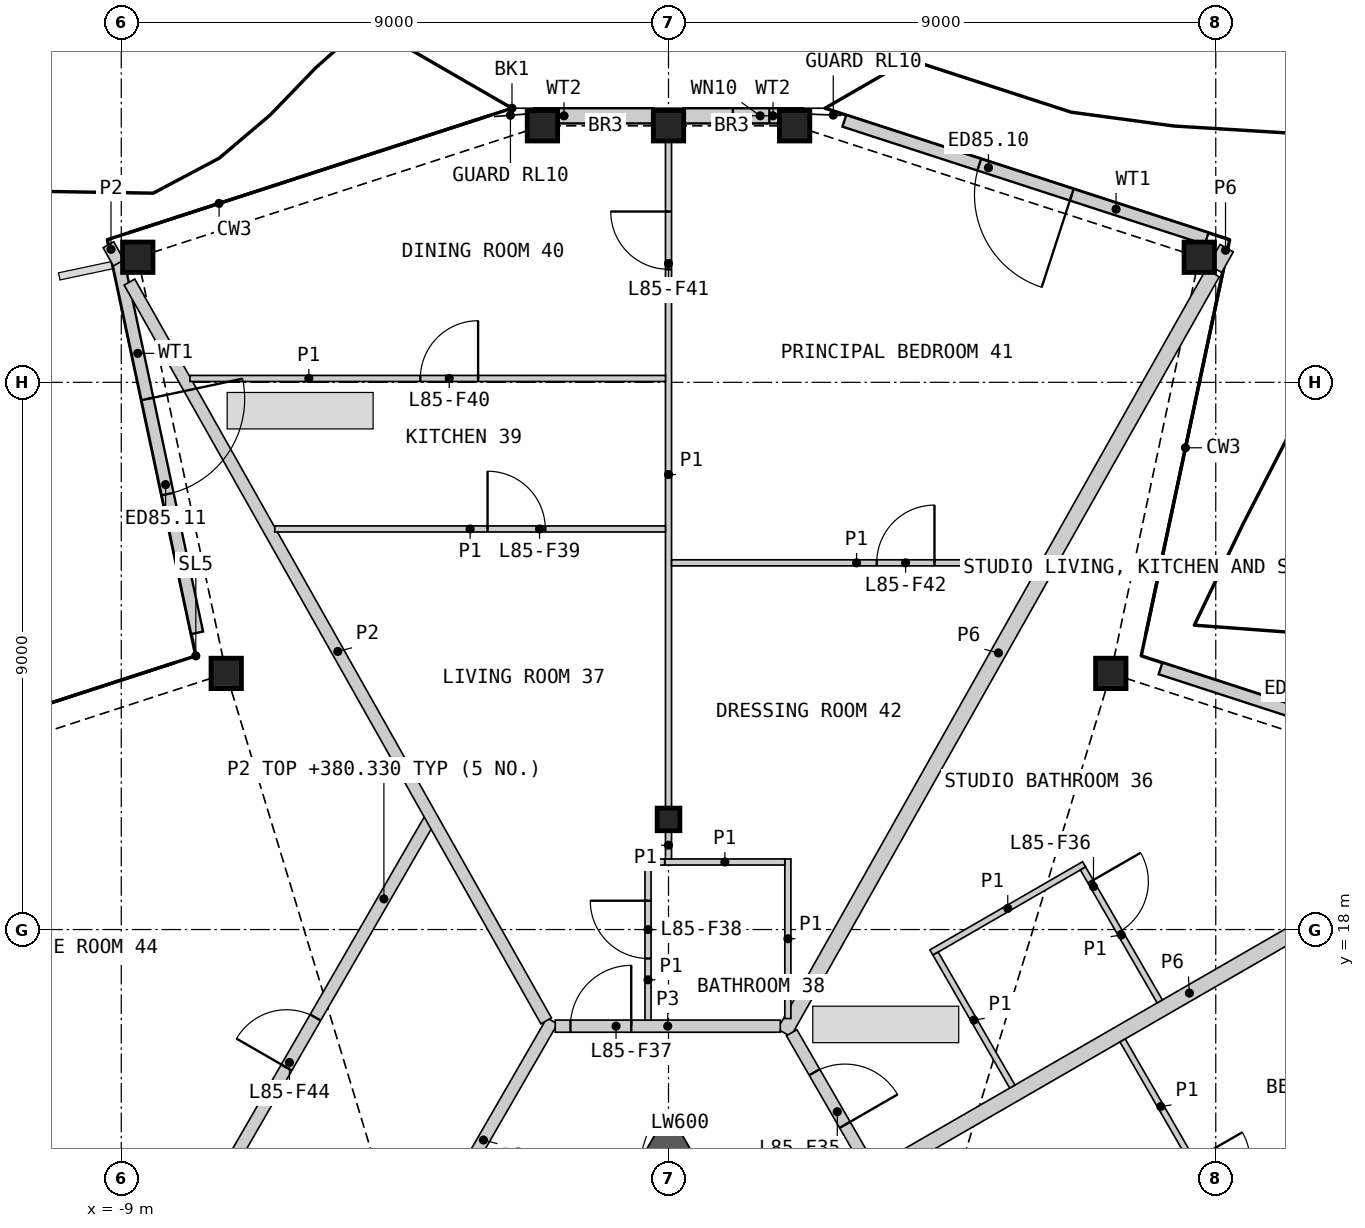
"""IFC4 building model, lengths in metres.
Left out: names, types, materials, properties, quantities, classifications, styles, units other than length and angle.
Written with IfcOpenShell. Run it as: python <this file> out.ifc"""

import sys

from ifc_helpers import new_model, si_unit, direction, frame, frame_2d, origin, origin_2d, place, context, subcontext, project, spatial, polyline, rectangle, hollow_rectangle, i_section, outline, extrude, element, fill, save


model = new_model("IFC4")
c1 = context("Model", 3, precision=1e-05, world=origin(), true_north=direction((0.0, 1.0)))
c2 = subcontext(c1, "Body", "Model", "MODEL_VIEW")
j1 = project(units=[si_unit("LENGTHUNIT", "METRE"), si_unit("PLANEANGLEUNIT", "RADIAN")], contexts=[c1])
p1 = place(None, origin())
s1 = spatial("IfcSite", under=j1, at=p1, CompositionType="ELEMENT")
p2 = place(p1, origin())
s2 = spatial("IfcBuilding", under=s1, at=p2, CompositionType="ELEMENT")
p3 = place(p2, frame((0.0, 0.0, 378.0)))
s3 = spatial("IfcBuildingStorey", under=s2, at=p3, CompositionType="ELEMENT", Elevation=378.0)
for number, where, z_axis, x_axis in (
    (1, (7.274, 22.213, 0.0), (0.0, 0.0, 1.0), (1.0, 0.0, 0.0)),
    (2, (8.729, 29.057, 0.0), (0.0, 0.0, 1.0), (1.0, 0.0, 0.0)),
    (3, (2.074, 31.219, 0.0), (0.0, 0.0, 1.0), (1.0, 0.0, 0.0)),
    (4, (0.0, 31.219, 0.0), (0.0, 0.0, 1.0), (1.0, 0.0, 0.0)),
    (5, (-2.074, 31.219, 0.0), (0.0, 0.0, 1.0), (1.0, 0.0, 0.0)),
    (6, (-8.729, 29.057, 0.0), (0.0, 0.0, 1.0), (1.0, 0.0, 0.0)),
    (7, (-7.274, 22.213, 0.0), (0.0, 0.0, 1.0), (1.0, 0.0, 0.0)),
):
    element("IfcColumn", number, at=place(p3, frame(where, z_axis=z_axis, x_axis=x_axis)), inside=s3, PredefinedType="COLUMN", context=c2, shape_type="SweptSolid", body=[
        extrude(hollow_rectangle(XDim=0.5, YDim=0.5, WallThickness=0.03, at=origin_2d()), origin(), (0.0, 0.0, 1.0), 3.4),
    ])
p4 = place(p3, frame((0.0, 19.811, 0.0), z_axis=(0.0, 0.0, 1.0), x_axis=(1.0, 0.0, 0.0)))
e8 = element("IfcColumn", 8, at=p4, inside=s3, PredefinedType="COLUMN", context=c2, shape_type="SweptSolid", body=[
    extrude(i_section(OverallWidth=0.374, OverallDepth=0.372, WebThickness=0.016, FlangeThickness=0.026, at=origin_2d()), origin(), (0.0, 0.0, 1.0), 3.4),
])
p5 = place(p3, frame((14.05, 20.357, 0.0), z_axis=(0.0, 0.0, 1.0), x_axis=(-0.951060123915, 0.309005891041, 0.0)))
e9 = element("IfcWall", 9, at=p5, inside=s3, PredefinedType="SOLIDWALL", context=c2, shape_type="SweptSolid", body=[
    extrude(rectangle(XDim=6.265, YDim=0.2, at=frame_2d((3.133, 0.0))), origin(), (0.0, 0.0, 1.0), 2.634),
])
p6 = place(p5, frame((2.333, 0.0, 0.0)))
e10 = element("IfcOpeningElement", 10, at=p6, cuts=e9, PredefinedType="OPENING", context=c2, shape_type="SweptSolid", body=[
    extrude(rectangle(XDim=1.6, YDim=2.25, at=frame_2d((0.8, 1.125))), frame((0.0, 0.11, 0.0), z_axis=(0.0, -1.0, 0.0), x_axis=(1.0, 0.0, 0.0)), (0.0, 0.0, 1.0), 0.22),
])
p7 = place(p3, frame((8.85, 29.364, 0.0), z_axis=(0.0, 0.0, 1.0), x_axis=(-0.951048671744, 0.309041136379, 0.0)))
e11 = element("IfcWall", 11, at=p7, inside=s3, PredefinedType="SOLIDWALL", context=c2, shape_type="SweptSolid", body=[
    extrude(rectangle(XDim=6.265, YDim=0.2, at=frame_2d((3.133, 0.0))), origin(), (0.0, 0.0, 1.0), 2.634),
])
p8 = place(p7, frame((2.333, 0.0, 0.0)))
e12 = element("IfcOpeningElement", 12, at=p8, cuts=e11, PredefinedType="OPENING", context=c2, shape_type="SweptSolid", body=[
    extrude(rectangle(XDim=1.6, YDim=2.25, at=frame_2d((0.8, 1.125))), frame((0.0, 0.11, 0.0), z_axis=(0.0, -1.0, 0.0), x_axis=(1.0, 0.0, 0.0)), (0.0, 0.0, 1.0), 0.22),
])
p9 = place(p3, frame((2.208, 31.383, 0.0), z_axis=(0.0, 0.0, 1.0), x_axis=(-1.0, 0.0, 0.0)))
e13 = element("IfcWall", 13, at=p9, inside=s3, PredefinedType="SOLIDWALL", context=c2, shape_type="SweptSolid", body=[
    extrude(rectangle(XDim=1.958, YDim=0.25, at=frame_2d((0.979, 0.0))), origin(), (0.0, 0.0, 1.0), 2.634),
])
p10 = place(p9, frame((0.55, 0.0, 0.4)))
e14 = element("IfcOpeningElement", 14, at=p10, cuts=e13, PredefinedType="OPENING", context=c2, shape_type="SweptSolid", body=[
    extrude(rectangle(XDim=0.6, YDim=0.6, at=frame_2d((0.3, 0.3))), frame((0.0, 0.135, 0.0), z_axis=(0.0, -1.0, 0.0), x_axis=(1.0, 0.0, 0.0)), (0.0, 0.0, 1.0), 0.27),
])
p11 = place(p3, frame((-0.25, 31.383, 0.0), z_axis=(0.0, 0.0, 1.0), x_axis=(-1.0, 0.0, 0.0)))
e15 = element("IfcWall", 15, at=p11, inside=s3, PredefinedType="SOLIDWALL", context=c2, shape_type="SweptSolid", body=[
    extrude(rectangle(XDim=1.958, YDim=0.25, at=frame_2d((0.979, 0.0))), origin(), (0.0, 0.0, 1.0), 2.634),
])
p12 = place(p3, frame((-9.055, 29.009, 0.0), z_axis=(0.0, 0.0, 1.0), x_axis=(0.207926797195, -0.978144389652, 0.0)))
e16 = element("IfcWall", 16, at=p12, inside=s3, PredefinedType="SOLIDWALL", context=c2, shape_type="SweptSolid", body=[
    extrude(rectangle(XDim=6.265, YDim=0.2, at=frame_2d((3.133, 0.0))), origin(), (0.0, 0.0, 1.0), 2.634),
])
p13 = place(p12, frame((2.333, 0.0, 0.0)))
e17 = element("IfcOpeningElement", 17, at=p13, cuts=e16, PredefinedType="OPENING", context=c2, shape_type="SweptSolid", body=[
    extrude(rectangle(XDim=1.6, YDim=2.25, at=frame_2d((0.8, 1.125))), frame((0.0, 0.11, 0.0), z_axis=(0.0, -1.0, 0.0), x_axis=(1.0, 0.0, 0.0)), (0.0, 0.0, 1.0), 0.22),
])
p14 = place(p3, origin())
e18 = element("IfcWall", 18, at=p14, inside=s3, PredefinedType="SHEAR", context=c2, shape_type="SweptSolid", body=[
    extrude(outline(polyline([(-0.52, 14.111), (0.0, 15.011), (0.52, 14.111), (0.0, 13.811), (-0.52, 14.111)])), origin(), (0.0, 0.0, 1.0), 3.1),
])
p15 = place(p3, frame((1.902, 16.302, 0.0), z_axis=(0.0, 0.0, 1.0), x_axis=(0.491233789602, 0.871027763021, 0.0)))
e19 = element("IfcWall", 19, at=p15, inside=s3, PredefinedType="PARTITIONING", context=c2, shape_type="SweptSolid", body=[
    extrude(rectangle(XDim=14.345, YDim=0.25, at=frame_2d((7.173, 0.0))), origin(), (0.0, 0.0, 1.0), 2.33),
])
p16 = place(p3, frame((3.465, 14.01, 0.0), z_axis=(0.0, 0.0, 1.0), x_axis=(0.866032376801, 0.499987922186, 0.0)))
e20 = element("IfcWall", 20, at=p16, inside=s3, PredefinedType="PARTITIONING", context=c2, shape_type="SweptSolid", body=[
    extrude(rectangle(XDim=11.782, YDim=0.25, at=frame_2d((5.891, 0.0))), origin(), (0.0, 0.0, 1.0), 2.33),
])
p17 = place(p3, frame((-4.176, 12.579, 0.0), z_axis=(0.0, 0.0, 1.0), x_axis=(0.499974648164, 0.866040040179, 0.0)))
e21 = element("IfcWall", 21, at=p17, inside=s3, PredefinedType="PARTITIONING", context=c2, shape_type="SweptSolid", body=[
    extrude(rectangle(XDim=4.525, YDim=0.2, at=frame_2d((2.263, 0.0))), origin(), (0.0, 0.0, 1.0), 3.1),
])
p18 = place(p3, frame((2.025, 16.303, 0.0), z_axis=(0.0, 0.0, 1.0), x_axis=(0.500004215162, -0.866022970146, 0.0)))
e22 = element("IfcWall", 22, at=p18, inside=s3, PredefinedType="PARTITIONING", context=c2, shape_type="SweptSolid", body=[
    extrude(rectangle(XDim=4.3, YDim=0.2, at=frame_2d((2.15, 0.0))), origin(), (0.0, 0.0, 1.0), 3.1),
])
p19 = place(p18, frame((0.75, 0.0, 0.0)))
e23 = element("IfcOpeningElement", 23, at=p19, cuts=e22, PredefinedType="OPENING", context=c2, shape_type="SweptSolid", body=[
    extrude(rectangle(XDim=1.0, YDim=2.1, at=frame_2d((0.5, 1.05))), frame((0.0, 0.11, 0.0), z_axis=(0.0, -1.0, 0.0), x_axis=(1.0, 0.0, 0.0)), (0.0, 0.0, 1.0), 0.22),
])
p20 = place(p3, frame((-1.863, 16.411, 0.0), z_axis=(0.0, 0.0, 1.0), x_axis=(1.0, 0.0, 0.0)))
e24 = element("IfcWall", 24, at=p20, inside=s3, PredefinedType="PARTITIONING", context=c2, shape_type="SweptSolid", body=[
    extrude(rectangle(XDim=3.701, YDim=0.2, at=frame_2d((1.851, 0.0))), origin(), (0.0, 0.0, 1.0), 3.1),
])
p21 = place(p20, frame((0.25, 0.0, 0.0)))
e25 = element("IfcOpeningElement", 25, at=p21, cuts=e24, PredefinedType="OPENING", context=c2, shape_type="SweptSolid", body=[
    extrude(rectangle(XDim=1.0, YDim=2.1, at=frame_2d((0.5, 1.05))), frame((0.0, 0.11, 0.0), z_axis=(0.0, -1.0, 0.0), x_axis=(1.0, 0.0, 0.0)), (0.0, 0.0, 1.0), 0.22),
])
p22 = place(p3, frame((8.989, 28.868, 0.0), z_axis=(0.0, 0.0, 1.0), x_axis=(0.491394522511, 0.870937094885, 0.0)))
e26 = element("IfcWall", 26, at=p22, inside=s3, PredefinedType="PARTITIONING", context=c2, shape_type="SweptSolid", body=[
    extrude(rectangle(XDim=0.388, YDim=0.25, at=frame_2d((0.194, 0.0))), origin(), (0.0, 0.0, 1.0), 2.33),
])
p23 = place(p3, frame((-11.473, 6.74, 0.0), z_axis=(0.0, 0.0, 1.0), x_axis=(0.500001082559, 0.866024778768, 0.0)))
e27 = element("IfcWall", 27, at=p23, inside=s3, PredefinedType="PARTITIONING", context=c2, shape_type="SweptSolid", body=[
    extrude(rectangle(XDim=15.094, YDim=0.2, at=frame_2d((7.547, 0.0))), origin(), (0.0, 0.0, 1.0), 2.33),
])
p24 = place(p23, frame((10.383, 0.0, 0.0)))
e28 = element("IfcOpeningElement", 28, at=p24, cuts=e27, PredefinedType="OPENING", context=c2, shape_type="SweptSolid", body=[
    extrude(rectangle(XDim=0.95, YDim=2.1, at=frame_2d((0.475, 1.05))), frame((0.0, 0.11, 0.0), z_axis=(0.0, -1.0, 0.0), x_axis=(1.0, 0.0, 0.0)), (0.0, 0.0, 1.0), 0.22),
])
p25 = place(p3, frame((-8.865, 28.649, 0.0), z_axis=(0.0, 0.0, 1.0), x_axis=(0.491236420263, -0.871026279401, 0.0)))
e29 = element("IfcWall", 29, at=p25, inside=s3, PredefinedType="PARTITIONING", context=c2, shape_type="SweptSolid", body=[
    extrude(rectangle(XDim=13.95, YDim=0.2, at=frame_2d((6.975, 0.0))), origin(), (0.0, 0.0, 1.0), 2.33),
])
p26 = place(p3, frame((-9.211, 29.263, 0.0), z_axis=(0.0, 0.0, 1.0), x_axis=(0.4910719836, -0.871118996994, 0.0)))
e30 = element("IfcWall", 30, at=p26, inside=s3, PredefinedType="PARTITIONING", context=c2, shape_type="SweptSolid", body=[
    extrude(rectangle(XDim=0.343, YDim=0.2, at=frame_2d((0.171, 0.0))), origin(), (0.0, 0.0, 1.0), 2.33),
])
p27 = place(p3, frame((0.0, 20.008, 0.0), z_axis=(0.0, 0.0, 1.0), x_axis=(0.0, 1.0, 0.0)))
e31 = element("IfcWall", 31, at=p27, inside=s3, PredefinedType="PARTITIONING", context=c2, shape_type="SweptSolid", body=[
    extrude(rectangle(XDim=10.951, YDim=0.1, at=frame_2d((5.476, 0.0))), origin(), (0.0, 0.0, 1.0), 2.33),
])
p28 = place(p27, frame((8.851, 0.0, 0.0)))
e32 = element("IfcOpeningElement", 32, at=p28, cuts=e31, PredefinedType="OPENING", context=c2, shape_type="SweptSolid", body=[
    extrude(rectangle(XDim=0.95, YDim=2.1, at=frame_2d((0.475, 1.05))), frame((0.0, 0.06, 0.0), z_axis=(0.0, -1.0, 0.0), x_axis=(1.0, 0.0, 0.0)), (0.0, 0.0, 1.0), 0.12),
])
p29 = place(p3, frame((-7.871, 27.064, 0.0), z_axis=(0.0, 0.0, 1.0), x_axis=(1.0, 0.0, 0.0)))
e33 = element("IfcWall", 33, at=p29, inside=s3, PredefinedType="PARTITIONING", context=c2, shape_type="SweptSolid", body=[
    extrude(rectangle(XDim=7.821, YDim=0.1, at=frame_2d((3.91, 0.0))), origin(), (0.0, 0.0, 1.0), 2.33),
])
p30 = place(p29, frame((3.789, 0.0, 0.0)))
e34 = element("IfcOpeningElement", 34, at=p30, cuts=e33, PredefinedType="OPENING", context=c2, shape_type="SweptSolid", body=[
    extrude(rectangle(XDim=0.95, YDim=2.1, at=frame_2d((0.475, 1.05))), frame((0.0, 0.06, 0.0), z_axis=(0.0, -1.0, 0.0), x_axis=(1.0, 0.0, 0.0)), (0.0, 0.0, 1.0), 0.12),
])
p31 = place(p3, frame((-6.475, 24.589, 0.0), z_axis=(0.0, 0.0, 1.0), x_axis=(1.0, 0.0, 0.0)))
e35 = element("IfcWall", 35, at=p31, inside=s3, PredefinedType="PARTITIONING", context=c2, shape_type="SweptSolid", body=[
    extrude(rectangle(XDim=6.425, YDim=0.1, at=frame_2d((3.212, 0.0))), origin(), (0.0, 0.0, 1.0), 2.33),
])
p32 = place(p31, frame((3.499, 0.0, 0.0)))
e36 = element("IfcOpeningElement", 36, at=p32, cuts=e35, PredefinedType="OPENING", context=c2, shape_type="SweptSolid", body=[
    extrude(rectangle(XDim=0.95, YDim=2.1, at=frame_2d((0.475, 1.05))), frame((0.0, 0.06, 0.0), z_axis=(0.0, -1.0, 0.0), x_axis=(1.0, 0.0, 0.0)), (0.0, 0.0, 1.0), 0.12),
])
p33 = place(p3, frame((0.05, 24.031, 0.0), z_axis=(0.0, 0.0, 1.0), x_axis=(1.0, 0.0, 0.0)))
e37 = element("IfcWall", 37, at=p33, inside=s3, PredefinedType="PARTITIONING", context=c2, shape_type="SweptSolid", body=[
    extrude(rectangle(XDim=6.086, YDim=0.1, at=frame_2d((3.043, 0.0))), origin(), (0.0, 0.0, 1.0), 2.33),
])
p34 = place(p33, frame((3.374, 0.0, 0.0)))
e38 = element("IfcOpeningElement", 38, at=p34, cuts=e37, PredefinedType="OPENING", context=c2, shape_type="SweptSolid", body=[
    extrude(rectangle(XDim=0.95, YDim=2.1, at=frame_2d((0.475, 1.05))), frame((0.0, 0.06, 0.0), z_axis=(0.0, -1.0, 0.0), x_axis=(1.0, 0.0, 0.0)), (0.0, 0.0, 1.0), 0.12),
])
p35 = place(p3, frame((7.468, 16.176, 0.0), z_axis=(0.0, 0.0, 1.0), x_axis=(0.499990214365, -0.86603105345, 0.0)))
e39 = element("IfcWall", 39, at=p35, inside=s3, PredefinedType="PARTITIONING", context=c2, shape_type="SweptSolid", body=[
    extrude(rectangle(XDim=5.025, YDim=0.1, at=frame_2d((2.512, 0.0))), origin(), (0.0, 0.0, 1.0), 2.33),
])
p36 = place(p35, frame((2.293, 0.0, 0.0)))
e40 = element("IfcOpeningElement", 40, at=p36, cuts=e39, PredefinedType="OPENING", context=c2, shape_type="SweptSolid", body=[
    extrude(rectangle(XDim=0.95, YDim=2.1, at=frame_2d((0.475, 1.05))), frame((0.0, 0.06, 0.0), z_axis=(0.0, -1.0, 0.0), x_axis=(1.0, 0.0, 0.0)), (0.0, 0.0, 1.0), 0.12),
])
p37 = place(p3, frame((4.323, 17.623, 0.0), z_axis=(0.0, 0.0, 1.0), x_axis=(0.866032775405, 0.499987231761, 0.0)))
e41 = element("IfcWall", 41, at=p37, inside=s3, PredefinedType="PARTITIONING", context=c2, shape_type="SweptSolid", body=[
    extrude(rectangle(XDim=2.9, YDim=0.1, at=frame_2d((1.45, 0.0))), origin(), (0.0, 0.0, 1.0), 2.33),
])
p38 = place(p3, frame((1.963, 16.536, 0.0), z_axis=(0.0, 0.0, 1.0), x_axis=(0.0, 1.0, 0.0)))
e42 = element("IfcWall", 42, at=p38, inside=s3, PredefinedType="PARTITIONING", context=c2, shape_type="SweptSolid", body=[
    extrude(rectangle(XDim=2.625, YDim=0.1, at=frame_2d((1.312, 0.0))), origin(), (0.0, 0.0, 1.0), 2.33),
])
p39 = place(p3, frame((6.817, 19.004, 0.0), z_axis=(0.0, 0.0, 1.0), x_axis=(0.499976333282, -0.866039067339, 0.0)))
e43 = element("IfcWall", 43, at=p39, inside=s3, PredefinedType="PARTITIONING", context=c2, shape_type="SweptSolid", body=[
    extrude(rectangle(XDim=2.525, YDim=0.1, at=frame_2d((1.262, 0.0))), origin(), (0.0, 0.0, 1.0), 2.33),
])
p40 = place(p39, frame((0.25, 0.0, 0.0)))
e44 = element("IfcOpeningElement", 44, at=p40, cuts=e43, PredefinedType="OPENING", context=c2, shape_type="SweptSolid", body=[
    extrude(rectangle(XDim=0.95, YDim=2.1, at=frame_2d((0.475, 1.05))), frame((0.0, 0.06, 0.0), z_axis=(0.0, -1.0, 0.0), x_axis=(1.0, 0.0, 0.0)), (0.0, 0.0, 1.0), 0.12),
])
p41 = place(p3, frame((4.392, 17.604, 0.0), z_axis=(0.0, 0.0, 1.0), x_axis=(0.500048846702, -0.865997200291, 0.0)))
e45 = element("IfcWall", 45, at=p41, inside=s3, PredefinedType="PARTITIONING", context=c2, shape_type="SweptSolid", body=[
    extrude(rectangle(XDim=2.525, YDim=0.1, at=frame_2d((1.263, 0.0))), origin(), (0.0, 0.0, 1.0), 2.33),
])
p42 = place(p3, frame((-0.337, 16.511, 0.0), z_axis=(0.0, 0.0, 1.0), x_axis=(0.0, 1.0, 0.0)))
e46 = element("IfcWall", 46, at=p42, inside=s3, PredefinedType="PARTITIONING", context=c2, shape_type="SweptSolid", body=[
    extrude(rectangle(XDim=2.649, YDim=0.1, at=frame_2d((1.325, 0.0))), origin(), (0.0, 0.0, 1.0), 2.33),
])
p43 = place(p42, frame((1.013, 0.0, 0.0)))
e47 = element("IfcOpeningElement", 47, at=p43, cuts=e46, PredefinedType="OPENING", context=c2, shape_type="SweptSolid", body=[
    extrude(rectangle(XDim=0.95, YDim=2.1, at=frame_2d((0.475, 1.05))), frame((0.0, 0.06, 0.0), z_axis=(0.0, -1.0, 0.0), x_axis=(1.0, 0.0, 0.0)), (0.0, 0.0, 1.0), 0.12),
])
p44 = place(p3, frame((-0.06, 19.111, 0.0), z_axis=(0.0, 0.0, 1.0), x_axis=(1.0, 0.0, 0.0)))
e48 = element("IfcWall", 48, at=p44, inside=s3, PredefinedType="PARTITIONING", context=c2, shape_type="SweptSolid", body=[
    extrude(rectangle(XDim=1.973, YDim=0.1, at=frame_2d((0.987, 0.0))), origin(), (0.0, 0.0, 1.0), 2.33),
])
p45 = place(p3, frame((0.0, 19.161, 0.0), z_axis=(0.0, 0.0, 1.0), x_axis=(0.0, 1.0, 0.0)))
e49 = element("IfcWall", 49, at=p45, inside=s3, PredefinedType="PARTITIONING", context=c2, shape_type="SweptSolid", body=[
    extrude(rectangle(XDim=0.453, YDim=0.1, at=frame_2d((0.227, 0.0))), origin(), (0.0, 0.0, 1.0), 2.33),
])
p46 = place(p3, frame((-0.287, 19.11, 0.0), z_axis=(0.0, 0.0, 1.0), x_axis=(0.999994683407, 0.003260852229, 0.0)))
e50 = element("IfcWall", 50, at=p46, inside=s3, PredefinedType="PARTITIONING", context=c2, shape_type="SweptSolid", body=[
    extrude(rectangle(XDim=0.225, YDim=0.1, at=frame_2d((0.112, 0.0))), origin(), (0.0, 0.0, 1.0), 2.33),
])
p47 = place(p8, origin())
e51 = element("IfcDoor", 51, at=p47, inside=s3, OperationType="DOUBLE_DOOR_SINGLE_SWING", PredefinedType="DOOR", context=c2, shape_type="SweptSolid", body=[
    extrude(rectangle(XDim=1.6, YDim=2.25, at=frame_2d((0.8, 1.125))), frame((0.0, 0.025, 0.0), z_axis=(0.0, -1.0, 0.0), x_axis=(1.0, 0.0, 0.0)), (0.0, 0.0, 1.0), 0.05),
])
fill(e12, e51)
p48 = place(p10, origin())
e52 = element("IfcWindow", 52, at=p48, inside=s3, PartitioningType="SINGLE_PANEL", PredefinedType="WINDOW", context=c2, shape_type="SweptSolid", body=[
    extrude(rectangle(XDim=0.6, YDim=0.6, at=frame_2d((0.3, 0.3))), frame((0.0, 0.03, 0.0), z_axis=(0.0, -1.0, 0.0), x_axis=(1.0, 0.0, 0.0)), (0.0, 0.0, 1.0), 0.06),
])
fill(e14, e52)
p49 = place(p13, origin())
e53 = element("IfcDoor", 53, at=p49, inside=s3, OperationType="DOUBLE_DOOR_SINGLE_SWING", PredefinedType="DOOR", context=c2, shape_type="SweptSolid", body=[
    extrude(rectangle(XDim=1.6, YDim=2.25, at=frame_2d((0.8, 1.125))), frame((0.0, 0.025, 0.0), z_axis=(0.0, -1.0, 0.0), x_axis=(1.0, 0.0, 0.0)), (0.0, 0.0, 1.0), 0.05),
])
fill(e17, e53)
p50 = place(p19, origin())
e54 = element("IfcDoor", 54, at=p50, inside=s3, OperationType="SINGLE_SWING_RIGHT", PredefinedType="DOOR", context=c2, shape_type="SweptSolid", body=[
    extrude(rectangle(XDim=1.0, YDim=2.1, at=frame_2d((0.5, 1.05))), frame((0.0, 0.025, 0.0), z_axis=(0.0, -1.0, 0.0), x_axis=(1.0, 0.0, 0.0)), (0.0, 0.0, 1.0), 0.05),
])
fill(e23, e54)
p51 = place(p40, origin())
e55 = element("IfcDoor", 55, at=p51, inside=s3, OperationType="SINGLE_SWING_LEFT", PredefinedType="DOOR", context=c2, shape_type="SweptSolid", body=[
    extrude(rectangle(XDim=0.95, YDim=2.1, at=frame_2d((0.475, 1.05))), frame((0.0, 0.025, 0.0), z_axis=(0.0, -1.0, 0.0), x_axis=(1.0, 0.0, 0.0)), (0.0, 0.0, 1.0), 0.05),
])
fill(e44, e55)
p52 = place(p21, origin())
e56 = element("IfcDoor", 56, at=p52, inside=s3, OperationType="SINGLE_SWING_RIGHT", PredefinedType="DOOR", context=c2, shape_type="SweptSolid", body=[
    extrude(rectangle(XDim=1.0, YDim=2.1, at=frame_2d((0.5, 1.05))), frame((0.0, 0.025, 0.0), z_axis=(0.0, -1.0, 0.0), x_axis=(1.0, 0.0, 0.0)), (0.0, 0.0, 1.0), 0.05),
])
fill(e25, e56)
p53 = place(p43, origin())
e57 = element("IfcDoor", 57, at=p53, inside=s3, OperationType="SINGLE_SWING_RIGHT", PredefinedType="DOOR", context=c2, shape_type="SweptSolid", body=[
    extrude(rectangle(XDim=0.95, YDim=2.1, at=frame_2d((0.475, 1.05))), frame((0.0, 0.025, 0.0), z_axis=(0.0, -1.0, 0.0), x_axis=(1.0, 0.0, 0.0)), (0.0, 0.0, 1.0), 0.05),
])
fill(e47, e57)
p54 = place(p32, origin())
e58 = element("IfcDoor", 58, at=p54, inside=s3, OperationType="SINGLE_SWING_LEFT", PredefinedType="DOOR", context=c2, shape_type="SweptSolid", body=[
    extrude(rectangle(XDim=0.95, YDim=2.1, at=frame_2d((0.475, 1.05))), frame((0.0, 0.025, 0.0), z_axis=(0.0, -1.0, 0.0), x_axis=(1.0, 0.0, 0.0)), (0.0, 0.0, 1.0), 0.05),
])
fill(e36, e58)
p55 = place(p30, origin())
e59 = element("IfcDoor", 59, at=p55, inside=s3, OperationType="SINGLE_SWING_RIGHT", PredefinedType="DOOR", context=c2, shape_type="SweptSolid", body=[
    extrude(rectangle(XDim=0.95, YDim=2.1, at=frame_2d((0.475, 1.05))), frame((0.0, 0.025, 0.0), z_axis=(0.0, -1.0, 0.0), x_axis=(1.0, 0.0, 0.0)), (0.0, 0.0, 1.0), 0.05),
])
fill(e34, e59)
p56 = place(p28, origin())
e60 = element("IfcDoor", 60, at=p56, inside=s3, OperationType="SINGLE_SWING_RIGHT", PredefinedType="DOOR", context=c2, shape_type="SweptSolid", body=[
    extrude(rectangle(XDim=0.95, YDim=2.1, at=frame_2d((0.475, 1.05))), frame((0.0, 0.025, 0.0), z_axis=(0.0, -1.0, 0.0), x_axis=(1.0, 0.0, 0.0)), (0.0, 0.0, 1.0), 0.05),
])
fill(e32, e60)
p57 = place(p34, origin())
e61 = element("IfcDoor", 61, at=p57, inside=s3, OperationType="SINGLE_SWING_RIGHT", PredefinedType="DOOR", context=c2, shape_type="SweptSolid", body=[
    extrude(rectangle(XDim=0.95, YDim=2.1, at=frame_2d((0.475, 1.05))), frame((0.0, 0.025, 0.0), z_axis=(0.0, -1.0, 0.0), x_axis=(1.0, 0.0, 0.0)), (0.0, 0.0, 1.0), 0.05),
])
fill(e38, e61)
p58 = place(p24, origin())
e62 = element("IfcDoor", 62, at=p58, inside=s3, OperationType="SINGLE_SWING_LEFT", PredefinedType="DOOR", context=c2, shape_type="SweptSolid", body=[
    extrude(rectangle(XDim=0.95, YDim=2.1, at=frame_2d((0.475, 1.05))), frame((0.0, 0.025, 0.0), z_axis=(0.0, -1.0, 0.0), x_axis=(1.0, 0.0, 0.0)), (0.0, 0.0, 1.0), 0.05),
])
fill(e28, e62)
save(model, sys.argv[1])
